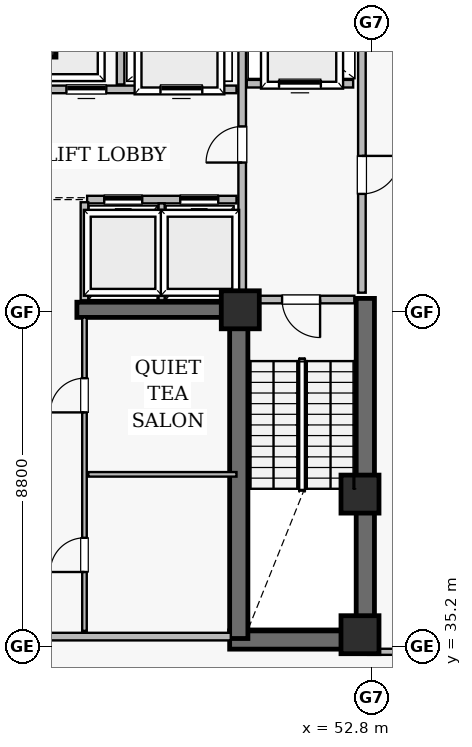
"""IFC4 building model, lengths in metres.
Left out: names, types, materials, properties, quantities, classifications, styles, units other than length and angle.
Written with IfcOpenShell. Run it as: python <this file> out.ifc"""

import sys

from ifc_helpers import new_model, si_unit, direction, frame, frame_2d, origin, origin_2d, place, context, subcontext, project, spatial, rectangle, extrude, element, fill, save


model = new_model("IFC4")
c1 = context("Model", 3, precision=1e-05, world=origin(), true_north=direction((0.0, 1.0)))
c2 = subcontext(c1, "Body", "Model", "MODEL_VIEW")
j1 = project(units=[si_unit("LENGTHUNIT", "METRE"), si_unit("PLANEANGLEUNIT", "RADIAN")], contexts=[c1])
p1 = place(None, origin())
s1 = spatial("IfcSite", under=j1, at=p1, CompositionType="ELEMENT")
p2 = place(p1, origin())
s2 = spatial("IfcBuilding", under=s1, at=p2, CompositionType="ELEMENT")
p3 = place(p2, frame((0.0, 0.0, 189.8)))
s3 = spatial("IfcBuildingStorey", under=s2, at=p3, CompositionType="ELEMENT", Elevation=189.8)
p4 = place(p3, frame((49.07, 35.36, 0.0), z_axis=(0.0, 0.0, 1.0), x_axis=(1.0, 0.0, 0.0)))
e1 = element("IfcWall", 1, at=p4, inside=s3, PredefinedType="SHEAR", context=c2, shape_type="SweptSolid", body=[
    extrude(rectangle(XDim=3.81, YDim=0.48, at=frame_2d((1.905, 0.0))), origin(), (0.0, 0.0, 1.0), 4.345),
])
p5 = place(p3, frame((52.64, 35.12, 0.0), z_axis=(0.0, 0.0, 1.0), x_axis=(0.0, 1.0, 0.0)))
e2 = element("IfcWall", 2, at=p5, inside=s3, PredefinedType="SHEAR", context=c2, shape_type="SweptSolid", body=[
    extrude(rectangle(XDim=9.23, YDim=0.48, at=frame_2d((4.615, 0.0))), origin(), (0.0, 0.0, 1.0), 4.345),
])
p6 = place(p3, frame((49.31, 35.4, 0.0), z_axis=(0.0, 0.0, 1.0), x_axis=(0.0, 1.0, 0.0)))
e3 = element("IfcWall", 3, at=p6, inside=s3, PredefinedType="SHEAR", context=c2, shape_type="SweptSolid", body=[
    extrude(rectangle(XDim=8.95, YDim=0.48, at=frame_2d((4.475, 0.0))), origin(), (0.0, 0.0, 1.0), 4.345),
])
p7 = place(p3, frame((45.05, 44.05, 0.0), z_axis=(0.0, 0.0, 1.0), x_axis=(1.0, 0.0, 0.0)))
e4 = element("IfcWall", 4, at=p7, inside=s3, PredefinedType="SHEAR", context=c2, shape_type="SweptSolid", body=[
    extrude(rectangle(XDim=4.2, YDim=0.4, at=frame_2d((2.1, 0.0))), origin(), (0.0, 0.0, 1.0), 4.345),
])
for number, where, z_axis, x_axis in (
    (5, (52.5, 35.5, 0.0), (0.0, 0.0, 1.0), (1.0, 0.0, 0.0)),
    (6, (52.5, 39.2, 0.0), (0.0, 0.0, 1.0), (1.0, 0.0, 0.0)),
    (7, (49.35, 44.05, 0.0), (0.0, 0.0, 1.0), (1.0, 0.0, 0.0)),
    (8, (44.0, 51.2, 0.0), (0.0, 0.0, 1.0), (1.0, 0.0, 0.0)),
):
    element("IfcColumn", number, at=place(p3, frame(where, z_axis=z_axis, x_axis=x_axis)), inside=s3, PredefinedType="COLUMN", context=c2, shape_type="SweptSolid", body=[
        extrude(rectangle(XDim=1.0, YDim=1.0, at=origin_2d()), origin(), (0.0, 0.0, 1.0), 4.6),
    ])
p8 = place(p3, frame((45.25, 35.6, 0.0), z_axis=(0.0, 0.0, 1.0), x_axis=(0.0, 1.0, 0.0)))
e9 = element("IfcWall", 9, at=p8, inside=s3, PredefinedType="PARTITIONING", context=c2, shape_type="SweptSolid", body=[
    extrude(rectangle(XDim=8.25, YDim=0.12, at=frame_2d((4.125, 0.0))), origin(), (0.0, 0.0, 1.0), 4.345),
])
p9 = place(p8, frame((1.55, 0.0, 0.0)))
e10 = element("IfcOpeningElement", 10, at=p9, cuts=e9, PredefinedType="OPENING", context=c2, shape_type="SweptSolid", body=[
    extrude(rectangle(XDim=0.9, YDim=2.1, at=frame_2d((0.45, 1.05))), frame((0.0, 0.07, 0.0), z_axis=(0.0, -1.0, 0.0), x_axis=(1.0, 0.0, 0.0)), (0.0, 0.0, 1.0), 0.14),
])
p10 = place(p8, frame((5.75, 0.0, 0.0)))
e11 = element("IfcOpeningElement", 11, at=p10, cuts=e9, PredefinedType="OPENING", context=c2, shape_type="SweptSolid", body=[
    extrude(rectangle(XDim=0.9, YDim=2.1, at=frame_2d((0.45, 1.05))), frame((0.0, 0.07, 0.0), z_axis=(0.0, -1.0, 0.0), x_axis=(1.0, 0.0, 0.0)), (0.0, 0.0, 1.0), 0.14),
])
p11 = place(p3, frame((52.55, 44.5, 0.0), z_axis=(0.0, 0.0, 1.0), x_axis=(0.0, 1.0, 0.0)))
e12 = element("IfcWall", 12, at=p11, inside=s3, PredefinedType="SOLIDWALL", context=c2, shape_type="SweptSolid", body=[
    extrude(rectangle(XDim=7.92, YDim=0.2, at=frame_2d((3.96, 0.0))), origin(), (0.0, 0.0, 1.0), 4.345),
])
p12 = place(p11, frame((2.6, 0.0, 0.0)))
e13 = element("IfcOpeningElement", 13, at=p12, cuts=e12, PredefinedType="OPENING", context=c2, shape_type="SweptSolid", body=[
    extrude(rectangle(XDim=1.0, YDim=2.15, at=frame_2d((0.5, 1.075))), frame((0.0, 0.11, 0.0), z_axis=(0.0, -1.0, 0.0), x_axis=(1.0, 0.0, 0.0)), (0.0, 0.0, 1.0), 0.22),
])
p13 = place(p3, frame((49.4, 44.5, 0.0), z_axis=(0.0, 0.0, 1.0), x_axis=(0.0, 1.0, 0.0)))
e14 = element("IfcWall", 14, at=p13, inside=s3, PredefinedType="SOLIDWALL", context=c2, shape_type="SweptSolid", body=[
    extrude(rectangle(XDim=7.92, YDim=0.2, at=frame_2d((3.96, 0.0))), origin(), (0.0, 0.0, 1.0), 3.433),
])
p14 = place(p13, frame((3.425, 0.0, 0.0)))
e15 = element("IfcOpeningElement", 15, at=p14, cuts=e14, PredefinedType="OPENING", context=c2, shape_type="SweptSolid", body=[
    extrude(rectangle(XDim=0.95, YDim=2.15, at=frame_2d((0.475, 1.075))), frame((0.0, 0.11, 0.0), z_axis=(0.0, -1.0, 0.0), x_axis=(1.0, 0.0, 0.0)), (0.0, 0.0, 1.0), 0.22),
])
p15 = place(p3, frame((44.25, 49.85, 0.0), z_axis=(0.0, 0.0, 1.0), x_axis=(1.0, 0.0, 0.0)))
e16 = element("IfcWall", 16, at=p15, inside=s3, PredefinedType="SOLIDWALL", context=c2, shape_type="SweptSolid", body=[
    extrude(rectangle(XDim=5.0, YDim=0.2, at=frame_2d((2.5, 0.0))), origin(), (0.0, 0.0, 1.0), 3.433),
])
p16 = place(p15, frame((0.525, 0.0, 0.0)))
e17 = element("IfcOpeningElement", 17, at=p16, cuts=e16, PredefinedType="OPENING", context=c2, shape_type="SweptSolid", body=[
    extrude(rectangle(XDim=1.05, YDim=2.15, at=frame_2d((0.525, 1.075))), frame((0.0, 0.11, 0.0), z_axis=(0.0, -1.0, 0.0), x_axis=(1.0, 0.0, 0.0)), (0.0, 0.0, 1.0), 0.22),
])
p17 = place(p15, frame((3.0, 0.0, 0.0)))
e18 = element("IfcOpeningElement", 18, at=p17, cuts=e16, PredefinedType="OPENING", context=c2, shape_type="SweptSolid", body=[
    extrude(rectangle(XDim=1.1, YDim=2.15, at=frame_2d((0.55, 1.075))), frame((0.0, 0.11, 0.0), z_axis=(0.0, -1.0, 0.0), x_axis=(1.0, 0.0, 0.0)), (0.0, 0.0, 1.0), 0.22),
])
p18 = place(p3, frame((45.32, 46.95, 0.0), z_axis=(0.0, 0.0, 1.0), x_axis=(1.0, 0.0, 0.0)))
e19 = element("IfcWall", 19, at=p18, inside=s3, PredefinedType="SOLIDWALL", context=c2, shape_type="SweptSolid", body=[
    extrude(rectangle(XDim=3.93, YDim=0.2, at=frame_2d((1.965, 0.0))), origin(), (0.0, 0.0, 1.0), 3.433),
])
p19 = place(p18, frame((0.45, 0.0, 0.0)))
e20 = element("IfcOpeningElement", 20, at=p19, cuts=e19, PredefinedType="OPENING", context=c2, shape_type="SweptSolid", body=[
    extrude(rectangle(XDim=1.0, YDim=2.15, at=frame_2d((0.5, 1.075))), frame((0.0, 0.11, 0.0), z_axis=(0.0, -1.0, 0.0), x_axis=(1.0, 0.0, 0.0)), (0.0, 0.0, 1.0), 0.22),
])
p20 = place(p18, frame((2.45, 0.0, 0.0)))
e21 = element("IfcOpeningElement", 21, at=p20, cuts=e19, PredefinedType="OPENING", context=c2, shape_type="SweptSolid", body=[
    extrude(rectangle(XDim=1.0, YDim=2.15, at=frame_2d((0.5, 1.075))), frame((0.0, 0.11, 0.0), z_axis=(0.0, -1.0, 0.0), x_axis=(1.0, 0.0, 0.0)), (0.0, 0.0, 1.0), 0.22),
])
p21 = place(p3, frame((49.55, 44.32, 0.0), z_axis=(0.0, 0.0, 1.0), x_axis=(1.0, 0.0, 0.0)))
e22 = element("IfcWall", 22, at=p21, inside=s3, PredefinedType="SOLIDWALL", context=c2, shape_type="SweptSolid", body=[
    extrude(rectangle(XDim=2.8, YDim=0.2, at=frame_2d((1.4, 0.0))), origin(), (0.0, 0.0, 1.0), 3.433),
])
p22 = place(p21, frame((0.9, 0.0, 0.0)))
e23 = element("IfcOpeningElement", 23, at=p22, cuts=e22, PredefinedType="OPENING", context=c2, shape_type="SweptSolid", body=[
    extrude(rectangle(XDim=1.0, YDim=2.15, at=frame_2d((0.5, 1.075))), frame((0.0, 0.11, 0.0), z_axis=(0.0, -1.0, 0.0), x_axis=(1.0, 0.0, 0.0)), (0.0, 0.0, 1.0), 0.22),
])
p23 = place(p3, frame((49.52, 50.0, 0.0), z_axis=(0.0, 0.0, 1.0), x_axis=(1.0, 0.0, 0.0)))
e24 = element("IfcWall", 24, at=p23, inside=s3, PredefinedType="SOLIDWALL", context=c2, shape_type="SweptSolid", body=[
    extrude(rectangle(XDim=2.8, YDim=0.2, at=frame_2d((1.4, 0.0))), origin(), (0.0, 0.0, 1.0), 4.345),
])
p24 = place(p23, frame((0.85, 0.0, 0.0)))
e25 = element("IfcOpeningElement", 25, at=p24, cuts=e24, PredefinedType="OPENING", context=c2, shape_type="SweptSolid", body=[
    extrude(rectangle(XDim=1.1, YDim=2.15, at=frame_2d((0.55, 1.075))), frame((0.0, 0.11, 0.0), z_axis=(0.0, -1.0, 0.0), x_axis=(1.0, 0.0, 0.0)), (0.0, 0.0, 1.0), 0.22),
])
p25 = place(p3, frame((38.9, 35.45, 0.0), z_axis=(0.0, 0.0, 1.0), x_axis=(1.0, 0.0, 0.0)))
e26 = element("IfcWall", 26, at=p25, inside=s3, PredefinedType="SOLIDWALL", context=c2, shape_type="SweptSolid", body=[
    extrude(rectangle(XDim=10.2, YDim=0.2, at=frame_2d((5.1, 0.0))), origin(), (0.0, 0.0, 1.0), 4.345),
])
p26 = place(p3, frame((45.35, 39.72, 0.0), z_axis=(0.0, 0.0, 1.0), x_axis=(1.0, 0.0, 0.0)))
e27 = element("IfcWall", 27, at=p26, inside=s3, PredefinedType="PARTITIONING", context=c2, shape_type="SweptSolid", body=[
    extrude(rectangle(XDim=3.9, YDim=0.12, at=frame_2d((1.95, 0.0))), origin(), (0.0, 0.0, 1.0), 4.345),
])
p27 = place(p3, frame((45.25, 44.3, 0.0), z_axis=(0.0, 0.0, 1.0), x_axis=(0.0, 1.0, 0.0)))
e28 = element("IfcWall", 28, at=p27, inside=s3, PredefinedType="SOLIDWALL", context=c2, shape_type="SweptSolid", body=[
    extrude(rectangle(XDim=2.58, YDim=0.2, at=frame_2d((1.29, 0.0))), origin(), (0.0, 0.0, 1.0), 4.345),
])
p28 = place(p3, frame((47.28, 44.3, 0.0), z_axis=(0.0, 0.0, 1.0), x_axis=(0.0, 1.0, 0.0)))
e29 = element("IfcWall", 29, at=p28, inside=s3, PredefinedType="SOLIDWALL", context=c2, shape_type="SweptSolid", body=[
    extrude(rectangle(XDim=2.55, YDim=0.16, at=frame_2d((1.275, 0.0))), origin(), (0.0, 0.0, 1.0), 3.433),
])
p29 = place(p3, frame((46.2, 49.98, 0.0), z_axis=(0.0, 0.0, 1.0), x_axis=(0.0, 1.0, 0.0)))
e30 = element("IfcWall", 30, at=p29, inside=s3, PredefinedType="SOLIDWALL", context=c2, shape_type="SweptSolid", body=[
    extrude(rectangle(XDim=2.37, YDim=0.2, at=frame_2d((1.185, 0.0))), origin(), (0.0, 0.0, 1.0), 4.345),
])
p30 = place(p3, frame((52.713, 35.05, 0.0), z_axis=(0.0, 0.0, 1.0), x_axis=(1.0, 0.0, 0.0)))
e31 = element("IfcWall", 31, at=p30, inside=s3, PredefinedType="SOLIDWALL", context=c2, shape_type="SweptSolid", body=[
    extrude(rectangle(XDim=1.807, YDim=0.16, at=frame_2d((0.904, 0.0))), origin(), (0.0, 0.0, 1.0), 4.345),
])
p31 = place(p22, frame((1.0, 0.0, 0.0), z_axis=(0.0, 0.0, 1.0), x_axis=(-1.0, 0.0, 0.0)))
e32 = element("IfcDoor", 32, at=p31, inside=s3, OperationType="SINGLE_SWING_RIGHT", PredefinedType="DOOR", context=c2, shape_type="SweptSolid", body=[
    extrude(rectangle(XDim=1.0, YDim=2.15, at=frame_2d((0.5, 1.075))), frame((0.0, 0.025, 0.0), z_axis=(0.0, -1.0, 0.0), x_axis=(1.0, 0.0, 0.0)), (0.0, 0.0, 1.0), 0.05),
])
fill(e23, e32)
p32 = place(p12, frame((1.0, 0.0, 0.0), z_axis=(0.0, 0.0, 1.0), x_axis=(-1.0, 0.0, 0.0)))
e33 = element("IfcDoor", 33, at=p32, inside=s3, OperationType="SINGLE_SWING_RIGHT", PredefinedType="DOOR", context=c2, shape_type="SweptSolid", body=[
    extrude(rectangle(XDim=1.0, YDim=2.15, at=frame_2d((0.5, 1.075))), frame((0.0, 0.025, 0.0), z_axis=(0.0, -1.0, 0.0), x_axis=(1.0, 0.0, 0.0)), (0.0, 0.0, 1.0), 0.05),
])
fill(e13, e33)
p33 = place(p14, origin())
e34 = element("IfcDoor", 34, at=p33, inside=s3, OperationType="SINGLE_SWING_LEFT", PredefinedType="DOOR", context=c2, shape_type="SweptSolid", body=[
    extrude(rectangle(XDim=0.95, YDim=2.15, at=frame_2d((0.475, 1.075))), frame((0.0, 0.025, 0.0), z_axis=(0.0, -1.0, 0.0), x_axis=(1.0, 0.0, 0.0)), (0.0, 0.0, 1.0), 0.05),
])
fill(e15, e34)
p34 = place(p24, origin())
e35 = element("IfcDoor", 35, at=p34, inside=s3, OperationType="SLIDING_TO_LEFT", PredefinedType="DOOR", context=c2, shape_type="SweptSolid", body=[
    extrude(rectangle(XDim=1.1, YDim=2.15, at=frame_2d((0.55, 1.075))), frame((0.0, 0.025, 0.0), z_axis=(0.0, -1.0, 0.0), x_axis=(1.0, 0.0, 0.0)), (0.0, 0.0, 1.0), 0.05),
])
fill(e25, e35)
p35 = place(p16, origin())
e36 = element("IfcDoor", 36, at=p35, inside=s3, OperationType="SLIDING_TO_LEFT", PredefinedType="DOOR", context=c2, shape_type="SweptSolid", body=[
    extrude(rectangle(XDim=1.05, YDim=2.15, at=frame_2d((0.525, 1.075))), frame((0.0, 0.025, 0.0), z_axis=(0.0, -1.0, 0.0), x_axis=(1.0, 0.0, 0.0)), (0.0, 0.0, 1.0), 0.05),
])
fill(e17, e36)
p36 = place(p17, origin())
e37 = element("IfcDoor", 37, at=p36, inside=s3, OperationType="SLIDING_TO_LEFT", PredefinedType="DOOR", context=c2, shape_type="SweptSolid", body=[
    extrude(rectangle(XDim=1.1, YDim=2.15, at=frame_2d((0.55, 1.075))), frame((0.0, 0.025, 0.0), z_axis=(0.0, -1.0, 0.0), x_axis=(1.0, 0.0, 0.0)), (0.0, 0.0, 1.0), 0.05),
])
fill(e18, e37)
p37 = place(p19, origin())
e38 = element("IfcDoor", 38, at=p37, inside=s3, OperationType="SLIDING_TO_LEFT", PredefinedType="DOOR", context=c2, shape_type="SweptSolid", body=[
    extrude(rectangle(XDim=1.0, YDim=2.15, at=frame_2d((0.5, 1.075))), frame((0.0, 0.025, 0.0), z_axis=(0.0, -1.0, 0.0), x_axis=(1.0, 0.0, 0.0)), (0.0, 0.0, 1.0), 0.05),
])
fill(e20, e38)
p38 = place(p20, origin())
e39 = element("IfcDoor", 39, at=p38, inside=s3, OperationType="SLIDING_TO_LEFT", PredefinedType="DOOR", context=c2, shape_type="SweptSolid", body=[
    extrude(rectangle(XDim=1.0, YDim=2.15, at=frame_2d((0.5, 1.075))), frame((0.0, 0.025, 0.0), z_axis=(0.0, -1.0, 0.0), x_axis=(1.0, 0.0, 0.0)), (0.0, 0.0, 1.0), 0.05),
])
fill(e21, e39)
p39 = place(p9, origin())
e40 = element("IfcDoor", 40, at=p39, inside=s3, OperationType="SINGLE_SWING_LEFT", PredefinedType="DOOR", context=c2, shape_type="SweptSolid", body=[
    extrude(rectangle(XDim=0.9, YDim=2.1, at=frame_2d((0.45, 1.05))), frame((0.0, 0.025, 0.0), z_axis=(0.0, -1.0, 0.0), x_axis=(1.0, 0.0, 0.0)), (0.0, 0.0, 1.0), 0.05),
])
fill(e10, e40)
p40 = place(p10, origin())
e41 = element("IfcDoor", 41, at=p40, inside=s3, OperationType="SINGLE_SWING_LEFT", PredefinedType="DOOR", context=c2, shape_type="SweptSolid", body=[
    extrude(rectangle(XDim=0.9, YDim=2.1, at=frame_2d((0.45, 1.05))), frame((0.0, 0.025, 0.0), z_axis=(0.0, -1.0, 0.0), x_axis=(1.0, 0.0, 0.0)), (0.0, 0.0, 1.0), 0.05),
])
fill(e11, e41)
save(model, sys.argv[1])
